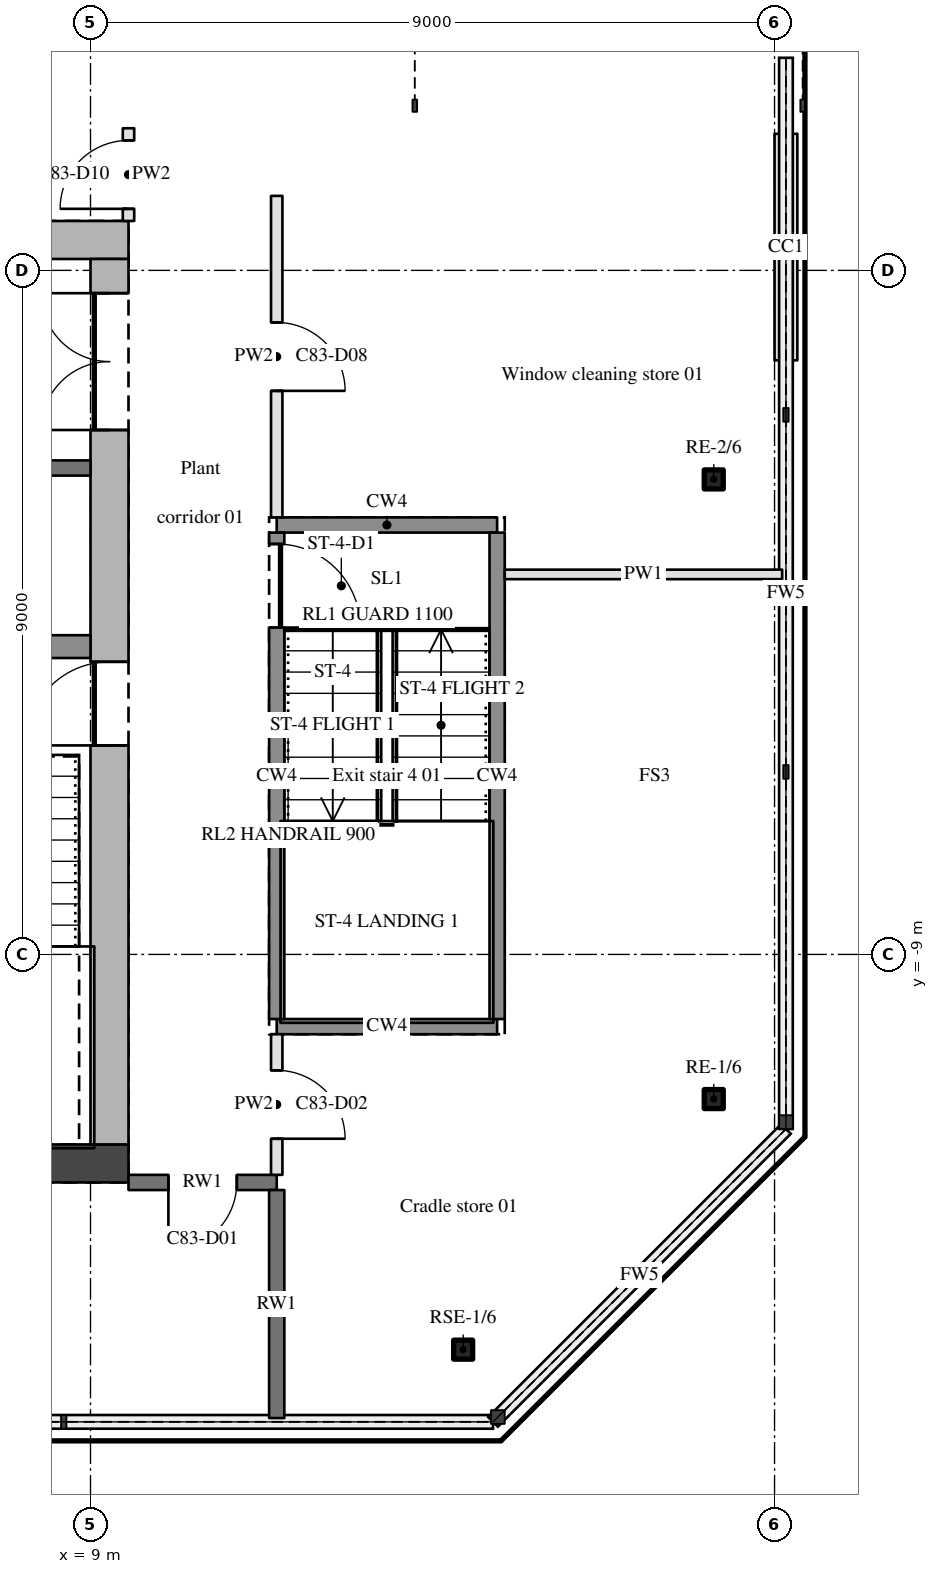
"""IFC4 building model, lengths in metres.
Left out: names, types, materials, properties, quantities, classifications, styles, units other than length and angle.
Written with IfcOpenShell. Run it as: python <this file> out.ifc"""

import sys

from ifc_helpers import new_model, si_unit, direction, frame, frame_2d, origin, origin_2d, place, context, subcontext, project, spatial, polyline, rectangle, hollow_rectangle, outline, extrude, element, fill, save


model = new_model("IFC4")
c1 = context("Model", 3, precision=1e-05, world=origin(), true_north=direction((0.0, 1.0)))
c2 = subcontext(c1, "Body", "Model", "MODEL_VIEW")
j1 = project(units=[si_unit("LENGTHUNIT", "METRE"), si_unit("PLANEANGLEUNIT", "RADIAN")], contexts=[c1])
p1 = place(None, origin())
s1 = spatial("IfcSite", under=j1, at=p1, CompositionType="ELEMENT")
p2 = place(p1, origin())
s2 = spatial("IfcBuilding", under=s1, at=p2, CompositionType="ELEMENT")
p3 = place(p2, frame((0.0, 0.0, 308.1)))
s3 = spatial("IfcBuildingStorey", under=s2, at=p3, CompositionType="ELEMENT", Elevation=308.1)
for number, where, z_axis, x_axis in (
    (1, (13.903, -14.2, 0.0), (0.0, 0.0, 1.0), (1.0, 0.0, 0.0)),
    (2, (17.2, -10.903, 0.0), (0.0, 0.0, 1.0), (1.0, 0.0, 0.0)),
    (3, (17.2, -2.75, 0.0), (0.0, 0.0, 1.0), (1.0, 0.0, 0.0)),
):
    element("IfcColumn", number, at=place(p3, frame(where, z_axis=z_axis, x_axis=x_axis)), inside=s3, PredefinedType="COLUMN", context=c2, shape_type="SweptSolid", body=[
        extrude(hollow_rectangle(XDim=0.25, YDim=0.25, WallThickness=0.02, InnerFilletRadius=0.03, OuterFilletRadius=0.05, at=origin_2d()), origin(), (0.0, 0.0, 1.0), 3.6),
    ])
for number, where, z_axis, x_axis in (
    (4, (-9.5, -11.75, 0.0), (0.0, 0.0, 1.0), (1.0, 0.0, 0.0)),
    (5, (-9.5, 0.4, 0.0), (0.0, 0.0, 1.0), (1.0, 0.0, 0.0)),
):
    element("IfcWall", number, at=place(p3, frame(where, z_axis=z_axis, x_axis=x_axis)), inside=s3, PredefinedType="SHEAR", context=c2, shape_type="SweptSolid", body=[
        extrude(outline(polyline([(0.0, 0.0), (19.0, 0.0), (19.0, 3.6), (0.0, 3.6), (0.0, 0.0)])), frame((0.0, 0.25, 0.0), z_axis=(0.0, -1.0, 0.0), x_axis=(1.0, 0.0, 0.0)), (0.0, 0.0, 1.0), 0.5),
    ])
p4 = place(p3, frame((9.25, -11.5, 0.0), z_axis=(0.0, 0.0, 1.0), x_axis=(0.0, 1.0, 0.0)))
e6 = element("IfcWall", 6, at=p4, inside=s3, PredefinedType="SHEAR", context=c2, shape_type="SweptSolid", body=[
    extrude(outline(polyline([(0.0, 0.0), (11.65, 0.0), (11.65, 3.6), (0.0, 3.6), (0.0, 0.0)])), frame((0.0, 0.25, 0.0), z_axis=(0.0, -1.0, 0.0), x_axis=(1.0, 0.0, 0.0)), (0.0, 0.0, 1.0), 0.5),
])
p5 = place(p4, frame((9.4, 0.0, 0.0)))
e7 = element("IfcOpeningElement", 7, at=p5, cuts=e6, PredefinedType="OPENING", context=c2, shape_type="SweptSolid", body=[
    extrude(rectangle(XDim=1.8, YDim=2.1, at=frame_2d((0.9, 1.05))), frame((0.0, 0.26, 0.0), z_axis=(0.0, -1.0, 0.0), x_axis=(1.0, 0.0, 0.0)), (0.0, 0.0, 1.0), 0.52),
])
p6 = place(p4, frame((5.25, 0.0, 0.0)))
e8 = element("IfcOpeningElement", 8, at=p6, cuts=e6, PredefinedType="OPENING", context=c2, shape_type="SweptSolid", body=[
    extrude(rectangle(XDim=1.1, YDim=2.1, at=frame_2d((0.55, 1.05))), frame((0.0, 0.26, 0.0), z_axis=(0.0, -1.0, 0.0), x_axis=(1.0, 0.0, 0.0)), (0.0, 0.0, 1.0), 0.52),
])
p7 = place(p3, frame((11.45, -12.0, 0.0), z_axis=(0.0, 0.0, 1.0), x_axis=(-1.0, 0.0, 0.0)))
e9 = element("IfcWall", 9, at=p7, inside=s3, PredefinedType="SOLIDWALL", context=c2, shape_type="SweptSolid", body=[
    extrude(rectangle(XDim=1.95, YDim=0.2, at=frame_2d((0.975, 0.0))), origin(), (0.0, 0.0, 1.0), 2.66),
])
p8 = place(p7, frame((0.525, 0.0, 0.0)))
e10 = element("IfcOpeningElement", 10, at=p8, cuts=e9, PredefinedType="OPENING", context=c2, shape_type="SweptSolid", body=[
    extrude(rectangle(XDim=0.9, YDim=2.1, at=frame_2d((0.45, 1.05))), frame((0.0, 0.11, 0.0), z_axis=(0.0, -1.0, 0.0), x_axis=(1.0, 0.0, 0.0)), (0.0, 0.0, 1.0), 0.22),
])
p9 = place(p3, frame((11.45, -9.95, 0.0), z_axis=(0.0, 0.0, 1.0), x_axis=(1.0, 0.0, 0.0)))
e11 = element("IfcWall", 11, at=p9, inside=s3, PredefinedType="SHEAR", context=c2, shape_type="SweptSolid", body=[
    extrude(rectangle(XDim=2.9, YDim=0.2, at=frame_2d((1.45, 0.0))), origin(), (0.0, 0.0, 1.0), 3.6),
])
p10 = place(p3, frame((6.0, -4.95, 0.0), z_axis=(0.0, 0.0, 1.0), x_axis=(1.0, 0.0, 0.0)))
e12 = element("IfcWall", 12, at=p10, inside=s3, PredefinedType="SHEAR", context=c2, shape_type="SweptSolid", body=[
    extrude(rectangle(XDim=3.0, YDim=0.3, at=frame_2d((1.5, 0.0))), origin(), (0.0, 0.0, 1.0), 3.6),
])
p11 = place(p3, frame((14.45, -4.0, 0.0), z_axis=(0.0, 0.0, 1.0), x_axis=(1.0, 0.0, 0.0)))
e13 = element("IfcWall", 13, at=p11, inside=s3, PredefinedType="PARTITIONING", context=c2, shape_type="SweptSolid", body=[
    extrude(rectangle(XDim=3.65, YDim=0.125, at=frame_2d((1.825, 0.0))), origin(), (0.0, 0.0, 1.0), 2.66),
])
p12 = place(p3, frame((11.45, -3.35, 0.0), z_axis=(0.0, 0.0, 1.0), x_axis=(1.0, 0.0, 0.0)))
e14 = element("IfcWall", 14, at=p12, inside=s3, PredefinedType="SHEAR", context=c2, shape_type="SweptSolid", body=[
    extrude(rectangle(XDim=2.9, YDim=0.2, at=frame_2d((1.45, 0.0))), origin(), (0.0, 0.0, 1.0), 3.6),
])
p13 = place(p3, frame((3.6, -2.6, 0.0), z_axis=(0.0, 0.0, 1.0), x_axis=(1.0, 0.0, 0.0)))
e15 = element("IfcWall", 15, at=p13, inside=s3, PredefinedType="SOLIDWALL", context=c2, shape_type="SweptSolid", body=[
    extrude(rectangle(XDim=5.4, YDim=0.2, at=frame_2d((2.7, 0.0))), origin(), (0.0, 0.0, 1.0), 2.66),
])
p14 = place(p3, frame((9.5, 0.65, 0.0), z_axis=(0.0, 0.0, 1.0), x_axis=(0.0, 1.0, 0.0)))
e16 = element("IfcWall", 16, at=p14, inside=s3, PredefinedType="PARTITIONING", context=c2, shape_type="SweptSolid", body=[
    extrude(rectangle(XDim=1.22, YDim=0.15, at=frame_2d((0.61, 0.0))), origin(), (0.0, 0.0, 1.0), 2.66),
])
p15 = place(p14, frame((0.16, 0.0, 0.0)))
e17 = element("IfcOpeningElement", 17, at=p15, cuts=e16, PredefinedType="OPENING", context=c2, shape_type="SweptSolid", body=[
    extrude(rectangle(XDim=0.9, YDim=2.1, at=frame_2d((0.45, 1.05))), frame((0.0, 0.085, 0.0), z_axis=(0.0, -1.0, 0.0), x_axis=(1.0, 0.0, 0.0)), (0.0, 0.0, 1.0), 0.17),
])
p16 = place(p3, frame((11.45, -15.1, 0.0), z_axis=(0.0, 0.0, 1.0), x_axis=(0.0, 1.0, 0.0)))
e18 = element("IfcWall", 18, at=p16, inside=s3, PredefinedType="SOLIDWALL", context=c2, shape_type="SweptSolid", body=[
    extrude(rectangle(XDim=3.0, YDim=0.2, at=frame_2d((1.5, 0.0))), origin(), (0.0, 0.0, 1.0), 2.66),
])
p17 = place(p3, frame((11.45, -10.05, 0.0), z_axis=(0.0, 0.0, 1.0), x_axis=(0.0, -1.0, 0.0)))
e19 = element("IfcWall", 19, at=p17, inside=s3, PredefinedType="PARTITIONING", context=c2, shape_type="SweptSolid", body=[
    extrude(rectangle(XDim=1.85, YDim=0.15, at=frame_2d((0.925, 0.0))), origin(), (0.0, 0.0, 1.0), 2.66),
])
p18 = place(p17, frame((0.475, 0.0, 0.0)))
e20 = element("IfcOpeningElement", 20, at=p18, cuts=e19, PredefinedType="OPENING", context=c2, shape_type="SweptSolid", body=[
    extrude(rectangle(XDim=0.9, YDim=2.1, at=frame_2d((0.45, 1.05))), frame((0.0, 0.085, 0.0), z_axis=(0.0, -1.0, 0.0), x_axis=(1.0, 0.0, 0.0)), (0.0, 0.0, 1.0), 0.17),
])
p19 = place(p3, frame((11.45, -3.45, 0.0), z_axis=(0.0, 0.0, 1.0), x_axis=(0.0, -1.0, 0.0)))
e21 = element("IfcWall", 21, at=p19, inside=s3, PredefinedType="SHEAR", context=c2, shape_type="SweptSolid", body=[
    extrude(rectangle(XDim=6.4, YDim=0.2, at=frame_2d((3.2, 0.0))), origin(), (0.0, 0.0, 1.0), 3.6),
])
p20 = place(p19, frame((0.15, 0.0, 0.0)))
e22 = element("IfcOpeningElement", 22, at=p20, cuts=e21, PredefinedType="OPENING", context=c2, shape_type="SweptSolid", body=[
    extrude(rectangle(XDim=1.1, YDim=2.1, at=frame_2d((0.55, 1.05))), frame((0.0, 0.11, 0.0), z_axis=(0.0, -1.0, 0.0), x_axis=(1.0, 0.0, 0.0)), (0.0, 0.0, 1.0), 0.22),
])
p21 = place(p3, frame((11.45, 0.98, 0.0), z_axis=(0.0, 0.0, 1.0), x_axis=(0.0, -1.0, 0.0)))
e23 = element("IfcWall", 23, at=p21, inside=s3, PredefinedType="PARTITIONING", context=c2, shape_type="SweptSolid", body=[
    extrude(rectangle(XDim=4.23, YDim=0.15, at=frame_2d((2.115, 0.0))), origin(), (0.0, 0.0, 1.0), 2.66),
])
p22 = place(p21, frame((1.665, 0.0, 0.0)))
e24 = element("IfcOpeningElement", 24, at=p22, cuts=e23, PredefinedType="OPENING", context=c2, shape_type="SweptSolid", body=[
    extrude(rectangle(XDim=0.9, YDim=2.1, at=frame_2d((0.45, 1.05))), frame((0.0, 0.085, 0.0), z_axis=(0.0, -1.0, 0.0), x_axis=(1.0, 0.0, 0.0)), (0.0, 0.0, 1.0), 0.17),
])
p23 = place(p3, frame((14.35, -9.85, 0.0), z_axis=(0.0, 0.0, 1.0), x_axis=(0.0, 1.0, 0.0)))
e25 = element("IfcWall", 25, at=p23, inside=s3, PredefinedType="SHEAR", context=c2, shape_type="SweptSolid", body=[
    extrude(rectangle(XDim=6.4, YDim=0.2, at=frame_2d((3.2, 0.0))), origin(), (0.0, 0.0, 1.0), 3.6),
])
p24 = place(p5, origin())
e26 = element("IfcDoor", 26, at=p24, inside=s3, OperationType="DOUBLE_DOOR_SINGLE_SWING", PredefinedType="DOOR", context=c2, shape_type="SweptSolid", body=[
    extrude(rectangle(XDim=1.8, YDim=2.1, at=frame_2d((0.9, 1.05))), frame((0.0, 0.025, 0.0), z_axis=(0.0, -1.0, 0.0), x_axis=(1.0, 0.0, 0.0)), (0.0, 0.0, 1.0), 0.05),
])
fill(e7, e26)
p25 = place(p6, origin())
e27 = element("IfcDoor", 27, at=p25, inside=s3, OperationType="SINGLE_SWING_LEFT", PredefinedType="DOOR", context=c2, shape_type="SweptSolid", body=[
    extrude(rectangle(XDim=1.1, YDim=2.1, at=frame_2d((0.55, 1.05))), frame((0.0, 0.025, 0.0), z_axis=(0.0, -1.0, 0.0), x_axis=(1.0, 0.0, 0.0)), (0.0, 0.0, 1.0), 0.05),
])
fill(e8, e27)
p26 = place(p20, origin())
e28 = element("IfcDoor", 28, at=p26, inside=s3, OperationType="SINGLE_SWING_RIGHT", PredefinedType="DOOR", context=c2, shape_type="SweptSolid", body=[
    extrude(rectangle(XDim=1.1, YDim=2.1, at=frame_2d((0.55, 1.05))), frame((0.0, 0.025, 0.0), z_axis=(0.0, -1.0, 0.0), x_axis=(1.0, 0.0, 0.0)), (0.0, 0.0, 1.0), 0.05),
])
fill(e22, e28)
p27 = place(p18, origin())
e29 = element("IfcDoor", 29, at=p27, inside=s3, OperationType="SINGLE_SWING_RIGHT", PredefinedType="DOOR", context=c2, shape_type="SweptSolid", body=[
    extrude(rectangle(XDim=0.9, YDim=2.1, at=frame_2d((0.45, 1.05))), frame((0.0, 0.025, 0.0), z_axis=(0.0, -1.0, 0.0), x_axis=(1.0, 0.0, 0.0)), (0.0, 0.0, 1.0), 0.05),
])
fill(e20, e29)
p28 = place(p22, origin())
e30 = element("IfcDoor", 30, at=p28, inside=s3, OperationType="SINGLE_SWING_RIGHT", PredefinedType="DOOR", context=c2, shape_type="SweptSolid", body=[
    extrude(rectangle(XDim=0.9, YDim=2.1, at=frame_2d((0.45, 1.05))), frame((0.0, 0.025, 0.0), z_axis=(0.0, -1.0, 0.0), x_axis=(1.0, 0.0, 0.0)), (0.0, 0.0, 1.0), 0.05),
])
fill(e24, e30)
p29 = place(p15, origin())
e31 = element("IfcDoor", 31, at=p29, inside=s3, OperationType="SINGLE_SWING_LEFT", PredefinedType="DOOR", context=c2, shape_type="SweptSolid", body=[
    extrude(rectangle(XDim=0.9, YDim=2.1, at=frame_2d((0.45, 1.05))), frame((0.0, 0.025, 0.0), z_axis=(0.0, -1.0, 0.0), x_axis=(1.0, 0.0, 0.0)), (0.0, 0.0, 1.0), 0.05),
])
fill(e17, e31)
p30 = place(p8, origin())
e32 = element("IfcDoor", 32, at=p30, inside=s3, OperationType="SINGLE_SWING_RIGHT", PredefinedType="DOOR", context=c2, shape_type="SweptSolid", body=[
    extrude(rectangle(XDim=0.9, YDim=2.1, at=frame_2d((0.45, 1.05))), frame((0.0, 0.025, 0.0), z_axis=(0.0, -1.0, 0.0), x_axis=(1.0, 0.0, 0.0)), (0.0, 0.0, 1.0), 0.05),
])
fill(e10, e32)
save(model, sys.argv[1])
